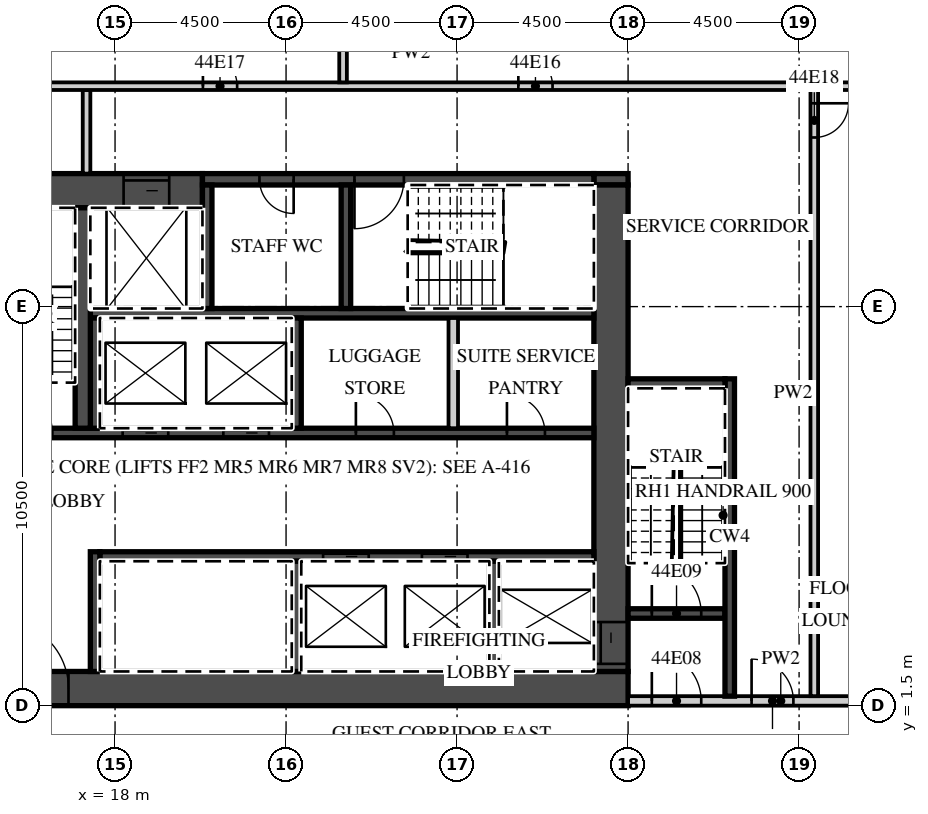
"""IFC4 building model, lengths in metres.
Left out: names, types, materials, properties, quantities, classifications, styles, units other than length and angle.
Written with IfcOpenShell. Run it as: python <this file> out.ifc"""

import sys

from ifc_helpers import new_model, si_unit, direction, frame, frame_2d, origin, place, context, subcontext, project, spatial, rectangle, extrude, element, fill, save


model = new_model("IFC4")
c1 = context("Model", 3, precision=1e-05, world=origin(), true_north=direction((0.0, 1.0)))
c2 = subcontext(c1, "Body", "Model", "MODEL_VIEW")
j1 = project(units=[si_unit("LENGTHUNIT", "METRE"), si_unit("PLANEANGLEUNIT", "RADIAN")], contexts=[c1])
p1 = place(None, origin())
s1 = spatial("IfcSite", under=j1, at=p1, CompositionType="ELEMENT")
p2 = place(p1, origin())
s2 = spatial("IfcBuilding", under=s1, at=p2, CompositionType="ELEMENT")
p3 = place(p2, frame((0.0, 0.0, 186.7)))
s3 = spatial("IfcBuildingStorey", under=s2, at=p3, CompositionType="ELEMENT", Elevation=186.7)
p4 = place(p3, frame((13.5, 1.95, 0.0), z_axis=(0.0, 0.0, 1.0), x_axis=(1.0, 0.0, 0.0)))
e1 = element("IfcWall", 1, at=p4, inside=s3, PredefinedType="SHEAR", context=c2, shape_type="SweptSolid", body=[
    extrude(rectangle(XDim=18.0, YDim=0.9, at=frame_2d((9.0, 0.0))), origin(), (0.0, 0.0, 1.0), 3.02),
])
p5 = place(p4, frame((1.475, 0.0, 0.0)))
e2 = element("IfcOpeningElement", 2, at=p5, cuts=e1, PredefinedType="OPENING", context=c2, shape_type="SweptSolid", body=[
    extrude(rectangle(XDim=1.8, YDim=2.1, at=frame_2d((0.9, 1.05))), frame((0.0, 0.46, 0.0), z_axis=(0.0, -1.0, 0.0), x_axis=(1.0, 0.0, 0.0)), (0.0, 0.0, 1.0), 0.92),
])
p6 = place(p3, frame((13.5, 15.05, 0.0), z_axis=(0.0, 0.0, 1.0), x_axis=(1.0, 0.0, 0.0)))
e3 = element("IfcWall", 3, at=p6, inside=s3, PredefinedType="SHEAR", context=c2, shape_type="SweptSolid", body=[
    extrude(rectangle(XDim=6.8, YDim=0.9, at=frame_2d((3.4, 0.0))), origin(), (0.0, 0.0, 1.0), 3.02),
])
p7 = place(p6, frame((4.725, 0.0, 0.0)))
e4 = element("IfcOpeningElement", 4, at=p7, cuts=e3, PredefinedType="OPENING", context=c2, shape_type="SweptSolid", body=[
    extrude(rectangle(XDim=1.2, YDim=2.1, at=frame_2d((0.6, 1.05))), frame((0.0, 0.46, 0.0), z_axis=(0.0, -1.0, 0.0), x_axis=(1.0, 0.0, 0.0)), (0.0, 0.0, 1.0), 0.92),
])
p8 = place(p3, frame((30.6, 15.35, 0.0), z_axis=(0.0, 0.0, 1.0), x_axis=(1.0, 0.0, 0.0)))
e5 = element("IfcWall", 5, at=p8, inside=s3, PredefinedType="SHEAR", context=c2, shape_type="SweptSolid", body=[
    extrude(rectangle(XDim=0.9, YDim=0.3, at=frame_2d((0.45, 0.0))), origin(), (0.0, 0.0, 1.0), 3.02),
])
p9 = place(p3, frame((20.3, 15.35, 0.0), z_axis=(0.0, 0.0, 1.0), x_axis=(1.0, 0.0, 0.0)))
e6 = element("IfcWall", 6, at=p9, inside=s3, PredefinedType="SHEAR", context=c2, shape_type="SweptSolid", body=[
    extrude(rectangle(XDim=10.3, YDim=0.3, at=frame_2d((5.15, 0.0))), origin(), (0.0, 0.0, 1.0), 3.02),
])
p10 = place(p9, frame((4.0, 0.0, 0.0)))
e7 = element("IfcOpeningElement", 7, at=p10, cuts=e6, PredefinedType="OPENING", context=c2, shape_type="SweptSolid", body=[
    extrude(rectangle(XDim=1.3, YDim=2.1, at=frame_2d((0.65, 1.05))), frame((0.0, 0.16, 0.0), z_axis=(0.0, -1.0, 0.0), x_axis=(1.0, 0.0, 0.0)), (0.0, 0.0, 1.0), 0.32),
])
p11 = place(p9, frame((1.5, 0.0, 0.0)))
e8 = element("IfcOpeningElement", 8, at=p11, cuts=e6, PredefinedType="OPENING", context=c2, shape_type="SweptSolid", body=[
    extrude(rectangle(XDim=0.9, YDim=2.1, at=frame_2d((0.45, 1.05))), frame((0.0, 0.16, 0.0), z_axis=(0.0, -1.0, 0.0), x_axis=(1.0, 0.0, 0.0)), (0.0, 0.0, 1.0), 0.32),
])
p12 = place(p3, frame((31.05, 2.4, 0.0), z_axis=(0.0, 0.0, 1.0), x_axis=(0.0, 1.0, 0.0)))
e9 = element("IfcWall", 9, at=p12, inside=s3, PredefinedType="SHEAR", context=c2, shape_type="SweptSolid", body=[
    extrude(rectangle(XDim=12.8, YDim=0.9, at=frame_2d((6.4, 0.0))), origin(), (0.0, 0.0, 1.0), 3.02),
])
p13 = place(p12, frame((0.2, 0.0, 0.0)))
e10 = element("IfcOpeningElement", 10, at=p13, cuts=e9, PredefinedType="OPENING", context=c2, shape_type="SweptSolid", body=[
    extrude(rectangle(XDim=1.1, YDim=2.1, at=frame_2d((0.55, 1.05))), frame((0.0, 0.46, 0.0), z_axis=(0.0, -1.0, 0.0), x_axis=(1.0, 0.0, 0.0)), (0.0, 0.0, 1.0), 0.92),
])
p14 = place(p3, frame((17.6, 5.425, 0.0), z_axis=(0.0, 0.0, 1.0), x_axis=(1.0, 0.0, 0.0)))
e11 = element("IfcWall", 11, at=p14, inside=s3, PredefinedType="SHEAR", context=c2, shape_type="SweptSolid", body=[
    extrude(rectangle(XDim=13.0, YDim=0.25, at=frame_2d((6.5, 0.0))), origin(), (0.0, 0.0, 1.0), 3.02),
])
p15 = place(p14, frame((8.475, 0.0, 0.0)))
e12 = element("IfcOpeningElement", 12, at=p15, cuts=e11, PredefinedType="OPENING", context=c2, shape_type="SweptSolid", body=[
    extrude(rectangle(XDim=1.2, YDim=2.1, at=frame_2d((0.6, 1.05))), frame((0.0, 0.135, 0.0), z_axis=(0.0, -1.0, 0.0), x_axis=(1.0, 0.0, 0.0)), (0.0, 0.0, 1.0), 0.27),
])
p16 = place(p14, frame((5.875, 0.0, 0.0)))
e13 = element("IfcOpeningElement", 13, at=p16, cuts=e11, PredefinedType="OPENING", context=c2, shape_type="SweptSolid", body=[
    extrude(rectangle(XDim=1.2, YDim=2.1, at=frame_2d((0.6, 1.05))), frame((0.0, 0.135, 0.0), z_axis=(0.0, -1.0, 0.0), x_axis=(1.0, 0.0, 0.0)), (0.0, 0.0, 1.0), 0.27),
])
p17 = place(p3, frame((17.475, 2.4, 0.0), z_axis=(0.0, 0.0, 1.0), x_axis=(0.0, 1.0, 0.0)))
e14 = element("IfcWall", 14, at=p17, inside=s3, PredefinedType="SHEAR", context=c2, shape_type="SweptSolid", body=[
    extrude(rectangle(XDim=3.15, YDim=0.25, at=frame_2d((1.575, 0.0))), origin(), (0.0, 0.0, 1.0), 3.02),
])
for number, where, z_axis, x_axis in (
    (15, (27.975, 2.4, 0.0), (0.0, 0.0, 1.0), (0.0, 1.0, 0.0)),
    (16, (22.775, 2.4, 0.0), (0.0, 0.0, 1.0), (0.0, 1.0, 0.0)),
):
    element("IfcWall", number, at=place(p3, frame(where, z_axis=z_axis, x_axis=x_axis)), inside=s3, PredefinedType="SHEAR", context=c2, shape_type="SweptSolid", body=[
        extrude(rectangle(XDim=2.9, YDim=0.25, at=frame_2d((1.45, 0.0))), origin(), (0.0, 0.0, 1.0), 3.02),
    ])
p18 = place(p3, frame((14.4, 8.675, 0.0), z_axis=(0.0, 0.0, 1.0), x_axis=(1.0, 0.0, 0.0)))
e17 = element("IfcWall", 17, at=p18, inside=s3, PredefinedType="SHEAR", context=c2, shape_type="SweptSolid", body=[
    extrude(rectangle(XDim=16.2, YDim=0.25, at=frame_2d((8.1, 0.0))), origin(), (0.0, 0.0, 1.0), 3.02),
])
p19 = place(p18, frame((6.45, 0.0, 0.0)))
e18 = element("IfcOpeningElement", 18, at=p19, cuts=e17, PredefinedType="OPENING", context=c2, shape_type="SweptSolid", body=[
    extrude(rectangle(XDim=1.2, YDim=2.1, at=frame_2d((0.6, 1.05))), frame((0.0, 0.135, 0.0), z_axis=(0.0, -1.0, 0.0), x_axis=(1.0, 0.0, 0.0)), (0.0, 0.0, 1.0), 0.27),
])
p20 = place(p18, frame((3.8, 0.0, 0.0)))
e19 = element("IfcOpeningElement", 19, at=p20, cuts=e17, PredefinedType="OPENING", context=c2, shape_type="SweptSolid", body=[
    extrude(rectangle(XDim=1.2, YDim=2.1, at=frame_2d((0.6, 1.05))), frame((0.0, 0.135, 0.0), z_axis=(0.0, -1.0, 0.0), x_axis=(1.0, 0.0, 0.0)), (0.0, 0.0, 1.0), 0.27),
])
p21 = place(p18, frame((0.65, 0.0, 0.0)))
e20 = element("IfcOpeningElement", 20, at=p21, cuts=e17, PredefinedType="OPENING", context=c2, shape_type="SweptSolid", body=[
    extrude(rectangle(XDim=1.3, YDim=2.1, at=frame_2d((0.65, 1.05))), frame((0.0, 0.135, 0.0), z_axis=(0.0, -1.0, 0.0), x_axis=(1.0, 0.0, 0.0)), (0.0, 0.0, 1.0), 0.27),
])
p22 = place(p18, frame((13.913, 0.0, 0.0)))
e21 = element("IfcOpeningElement", 21, at=p22, cuts=e17, PredefinedType="OPENING", context=c2, shape_type="SweptSolid", body=[
    extrude(rectangle(XDim=1.0, YDim=2.1, at=frame_2d((0.5, 1.05))), frame((0.0, 0.135, 0.0), z_axis=(0.0, -1.0, 0.0), x_axis=(1.0, 0.0, 0.0)), (0.0, 0.0, 1.0), 0.27),
])
p23 = place(p18, frame((9.938, 0.0, 0.0)))
e22 = element("IfcOpeningElement", 22, at=p23, cuts=e17, PredefinedType="OPENING", context=c2, shape_type="SweptSolid", body=[
    extrude(rectangle(XDim=1.0, YDim=2.1, at=frame_2d((0.5, 1.05))), frame((0.0, 0.135, 0.0), z_axis=(0.0, -1.0, 0.0), x_axis=(1.0, 0.0, 0.0)), (0.0, 0.0, 1.0), 0.27),
])
p24 = place(p3, frame((17.35, 11.825, 0.0), z_axis=(0.0, 0.0, 1.0), x_axis=(1.0, 0.0, 0.0)))
e23 = element("IfcWall", 23, at=p24, inside=s3, PredefinedType="SHEAR", context=c2, shape_type="SweptSolid", body=[
    extrude(rectangle(XDim=13.25, YDim=0.25, at=frame_2d((6.625, 0.0))), origin(), (0.0, 0.0, 1.0), 3.02),
])
for number, where, z_axis, x_axis in (
    (24, (17.475, 8.8, 0.0), (0.0, 0.0, 1.0), (0.0, 1.0, 0.0)),
    (25, (22.775, 8.8, 0.0), (0.0, 0.0, 1.0), (0.0, 1.0, 0.0)),
):
    element("IfcWall", number, at=place(p3, frame(where, z_axis=z_axis, x_axis=x_axis)), inside=s3, PredefinedType="SHEAR", context=c2, shape_type="SweptSolid", body=[
        extrude(rectangle(XDim=2.9, YDim=0.25, at=frame_2d((1.45, 0.0))), origin(), (0.0, 0.0, 1.0), 3.02),
    ])
p25 = place(p3, frame((26.9, 8.8, 0.0), z_axis=(0.0, 0.0, 1.0), x_axis=(0.0, 1.0, 0.0)))
e26 = element("IfcWall", 26, at=p25, inside=s3, PredefinedType="PARTITIONING", context=c2, shape_type="SweptSolid", body=[
    extrude(rectangle(XDim=2.9, YDim=0.25, at=frame_2d((1.45, 0.0))), origin(), (0.0, 0.0, 1.0), 3.02),
])
p26 = place(p3, frame((17.15, 8.8, 0.0), z_axis=(0.0, 0.0, 1.0), x_axis=(0.0, 1.0, 0.0)))
e27 = element("IfcWall", 27, at=p26, inside=s3, PredefinedType="SHEAR", context=c2, shape_type="SweptSolid", body=[
    extrude(rectangle(XDim=5.8, YDim=0.4, at=frame_2d((2.9, 0.0))), origin(), (0.0, 0.0, 1.0), 3.02),
])
for number, where, z_axis, x_axis in (
    (28, (20.425, 11.95, 0.0), (0.0, 0.0, 1.0), (0.0, 1.0, 0.0)),
    (29, (24.075, 11.95, 0.0), (0.0, 0.0, 1.0), (0.0, 1.0, 0.0)),
):
    element("IfcWall", number, at=place(p3, frame(where, z_axis=z_axis, x_axis=x_axis)), inside=s3, PredefinedType="SHEAR", context=c2, shape_type="SweptSolid", body=[
        extrude(rectangle(XDim=3.25, YDim=0.25, at=frame_2d((1.625, 0.0))), origin(), (0.0, 0.0, 1.0), 3.02),
    ])
p27 = place(p3, frame((31.5, 1.625, 0.0), z_axis=(0.0, 0.0, 1.0), x_axis=(1.0, 0.0, 0.0)))
e30 = element("IfcWall", 30, at=p27, inside=s3, PredefinedType="PARTITIONING", context=c2, shape_type="SweptSolid", body=[
    extrude(rectangle(XDim=8.035, YDim=0.25, at=frame_2d((4.018, 0.0))), origin(), (0.0, 0.0, 1.0), 3.02),
])
p28 = place(p27, frame((0.625, 0.0, 0.0)))
e31 = element("IfcOpeningElement", 31, at=p28, cuts=e30, PredefinedType="OPENING", context=c2, shape_type="SweptSolid", body=[
    extrude(rectangle(XDim=1.3, YDim=2.1, at=frame_2d((0.65, 1.05))), frame((0.0, 0.135, 0.0), z_axis=(0.0, -1.0, 0.0), x_axis=(1.0, 0.0, 0.0)), (0.0, 0.0, 1.0), 0.27),
])
p29 = place(p27, frame((3.25, 0.0, 0.0)))
e32 = element("IfcOpeningElement", 32, at=p29, cuts=e30, PredefinedType="OPENING", context=c2, shape_type="SweptSolid", body=[
    extrude(rectangle(XDim=1.1, YDim=2.1, at=frame_2d((0.55, 1.05))), frame((0.0, 0.135, 0.0), z_axis=(0.0, -1.0, 0.0), x_axis=(1.0, 0.0, 0.0)), (0.0, 0.0, 1.0), 0.27),
])
p30 = place(p3, frame((31.5, 3.925, 0.0), z_axis=(0.0, 0.0, 1.0), x_axis=(1.0, 0.0, 0.0)))
e33 = element("IfcWall", 33, at=p30, inside=s3, PredefinedType="SHEAR", context=c2, shape_type="SweptSolid", body=[
    extrude(rectangle(XDim=2.55, YDim=0.25, at=frame_2d((1.275, 0.0))), origin(), (0.0, 0.0, 1.0), 3.02),
])
p31 = place(p30, frame((0.625, 0.0, 0.0)))
e34 = element("IfcOpeningElement", 34, at=p31, cuts=e33, PredefinedType="OPENING", context=c2, shape_type="SweptSolid", body=[
    extrude(rectangle(XDim=1.3, YDim=2.1, at=frame_2d((0.65, 1.05))), frame((0.0, 0.135, 0.0), z_axis=(0.0, -1.0, 0.0), x_axis=(1.0, 0.0, 0.0)), (0.0, 0.0, 1.0), 0.27),
])
p32 = place(p3, frame((34.175, 1.75, 0.0), z_axis=(0.0, 0.0, 1.0), x_axis=(0.0, 1.0, 0.0)))
e35 = element("IfcWall", 35, at=p32, inside=s3, PredefinedType="SHEAR", context=c2, shape_type="SweptSolid", body=[
    extrude(rectangle(XDim=8.35, YDim=0.25, at=frame_2d((4.175, 0.0))), origin(), (0.0, 0.0, 1.0), 3.02),
])
p33 = place(p3, frame((31.5, 9.975, 0.0), z_axis=(0.0, 0.0, 1.0), x_axis=(1.0, 0.0, 0.0)))
e36 = element("IfcWall", 36, at=p33, inside=s3, PredefinedType="SHEAR", context=c2, shape_type="SweptSolid", body=[
    extrude(rectangle(XDim=2.55, YDim=0.25, at=frame_2d((1.275, 0.0))), origin(), (0.0, 0.0, 1.0), 3.02),
])
p34 = place(p3, frame((17.25, 15.5, 0.0), z_axis=(0.0, 0.0, 1.0), x_axis=(0.0, 1.0, 0.0)))
e37 = element("IfcWall", 37, at=p34, inside=s3, PredefinedType="PARTITIONING", context=c2, shape_type="SweptSolid", body=[
    extrude(rectangle(XDim=2.2, YDim=0.2, at=frame_2d((1.1, 0.0))), origin(), (0.0, 0.0, 1.0), 3.02),
])
p35 = place(p3, frame((36.4, 1.75, 0.0), z_axis=(0.0, 0.0, 1.0), x_axis=(0.0, 1.0, 0.0)))
e38 = element("IfcWall", 38, at=p35, inside=s3, PredefinedType="PARTITIONING", context=c2, shape_type="SweptSolid", body=[
    extrude(rectangle(XDim=15.95, YDim=0.2, at=frame_2d((7.975, 0.0))), origin(), (0.0, 0.0, 1.0), 3.02),
])
p36 = place(p35, frame((14.7, 0.0, 0.0)))
e39 = element("IfcOpeningElement", 39, at=p36, cuts=e38, PredefinedType="OPENING", context=c2, shape_type="SweptSolid", body=[
    extrude(rectangle(XDim=0.9, YDim=2.1, at=frame_2d((0.45, 1.05))), frame((0.0, 0.11, 0.0), z_axis=(0.0, -1.0, 0.0), x_axis=(1.0, 0.0, 0.0)), (0.0, 0.0, 1.0), 0.22),
])
p37 = place(p3, frame((13.6, 17.8, 0.0), z_axis=(0.0, 0.0, 1.0), x_axis=(1.0, 0.0, 0.0)))
e40 = element("IfcWall", 40, at=p37, inside=s3, PredefinedType="PARTITIONING", context=c2, shape_type="SweptSolid", body=[
    extrude(rectangle(XDim=24.378, YDim=0.2, at=frame_2d((12.189, 0.0))), origin(), (0.0, 0.0, 1.0), 3.02),
])
p38 = place(p37, frame((15.012, 0.0, 0.0)))
e41 = element("IfcOpeningElement", 41, at=p38, cuts=e40, PredefinedType="OPENING", context=c2, shape_type="SweptSolid", body=[
    extrude(rectangle(XDim=0.9, YDim=2.1, at=frame_2d((0.45, 1.05))), frame((0.0, 0.11, 0.0), z_axis=(0.0, -1.0, 0.0), x_axis=(1.0, 0.0, 0.0)), (0.0, 0.0, 1.0), 0.22),
])
p39 = place(p37, frame((6.712, 0.0, 0.0)))
e42 = element("IfcOpeningElement", 42, at=p39, cuts=e40, PredefinedType="OPENING", context=c2, shape_type="SweptSolid", body=[
    extrude(rectangle(XDim=0.9, YDim=2.1, at=frame_2d((0.45, 1.05))), frame((0.0, 0.11, 0.0), z_axis=(0.0, -1.0, 0.0), x_axis=(1.0, 0.0, 0.0)), (0.0, 0.0, 1.0), 0.22),
])
p40 = place(p3, frame((24.0, 17.9, 0.0), z_axis=(0.0, 0.0, 1.0), x_axis=(0.0, 1.0, 0.0)))
e43 = element("IfcWall", 43, at=p40, inside=s3, PredefinedType="PARTITIONING", context=c2, shape_type="SweptSolid", body=[
    extrude(rectangle(XDim=4.701, YDim=0.2, at=frame_2d((2.351, 0.0))), origin(), (0.0, 0.0, 1.0), 3.02),
])
p41 = place(p19, origin())
e44 = element("IfcDoor", 44, at=p41, inside=s3, OperationType="SLIDING_TO_LEFT", PredefinedType="DOOR", context=c2, shape_type="SweptSolid", body=[
    extrude(rectangle(XDim=1.2, YDim=2.1, at=frame_2d((0.6, 1.05))), frame((0.0, 0.025, 0.0), z_axis=(0.0, -1.0, 0.0), x_axis=(1.0, 0.0, 0.0)), (0.0, 0.0, 1.0), 0.05),
])
fill(e18, e44)
p42 = place(p20, origin())
e45 = element("IfcDoor", 45, at=p42, inside=s3, OperationType="SLIDING_TO_RIGHT", PredefinedType="DOOR", context=c2, shape_type="SweptSolid", body=[
    extrude(rectangle(XDim=1.2, YDim=2.1, at=frame_2d((0.6, 1.05))), frame((0.0, 0.025, 0.0), z_axis=(0.0, -1.0, 0.0), x_axis=(1.0, 0.0, 0.0)), (0.0, 0.0, 1.0), 0.05),
])
fill(e19, e45)
p43 = place(p15, origin())
e46 = element("IfcDoor", 46, at=p43, inside=s3, OperationType="SLIDING_TO_LEFT", PredefinedType="DOOR", context=c2, shape_type="SweptSolid", body=[
    extrude(rectangle(XDim=1.2, YDim=2.1, at=frame_2d((0.6, 1.05))), frame((0.0, 0.025, 0.0), z_axis=(0.0, -1.0, 0.0), x_axis=(1.0, 0.0, 0.0)), (0.0, 0.0, 1.0), 0.05),
])
fill(e12, e46)
p44 = place(p16, origin())
e47 = element("IfcDoor", 47, at=p44, inside=s3, OperationType="SLIDING_TO_RIGHT", PredefinedType="DOOR", context=c2, shape_type="SweptSolid", body=[
    extrude(rectangle(XDim=1.2, YDim=2.1, at=frame_2d((0.6, 1.05))), frame((0.0, 0.025, 0.0), z_axis=(0.0, -1.0, 0.0), x_axis=(1.0, 0.0, 0.0)), (0.0, 0.0, 1.0), 0.05),
])
fill(e13, e47)
p45 = place(p7, origin())
e48 = element("IfcDoor", 48, at=p45, inside=s3, OperationType="SLIDING_TO_LEFT", PredefinedType="DOOR", context=c2, shape_type="SweptSolid", body=[
    extrude(rectangle(XDim=1.2, YDim=2.1, at=frame_2d((0.6, 1.05))), frame((0.0, 0.025, 0.0), z_axis=(0.0, -1.0, 0.0), x_axis=(1.0, 0.0, 0.0)), (0.0, 0.0, 1.0), 0.05),
])
fill(e4, e48)
p46 = place(p13, origin())
e49 = element("IfcDoor", 49, at=p46, inside=s3, OperationType="SLIDING_TO_LEFT", PredefinedType="DOOR", context=c2, shape_type="SweptSolid", body=[
    extrude(rectangle(XDim=1.1, YDim=2.1, at=frame_2d((0.55, 1.05))), frame((0.0, 0.025, 0.0), z_axis=(0.0, -1.0, 0.0), x_axis=(1.0, 0.0, 0.0)), (0.0, 0.0, 1.0), 0.05),
])
fill(e10, e49)
p47 = place(p5, origin())
e50 = element("IfcDoor", 50, at=p47, inside=s3, OperationType="DOUBLE_DOOR_DOUBLE_SWING", PredefinedType="DOOR", context=c2, shape_type="SweptSolid", body=[
    extrude(rectangle(XDim=1.8, YDim=2.1, at=frame_2d((0.9, 1.05))), frame((0.0, 0.025, 0.0), z_axis=(0.0, -1.0, 0.0), x_axis=(1.0, 0.0, 0.0)), (0.0, 0.0, 1.0), 0.05),
])
fill(e2, e50)
p48 = place(p28, origin())
e51 = element("IfcDoor", 51, at=p48, inside=s3, OperationType="SINGLE_SWING_LEFT", PredefinedType="DOOR", context=c2, shape_type="SweptSolid", body=[
    extrude(rectangle(XDim=1.3, YDim=2.1, at=frame_2d((0.65, 1.05))), frame((0.0, 0.025, 0.0), z_axis=(0.0, -1.0, 0.0), x_axis=(1.0, 0.0, 0.0)), (0.0, 0.0, 1.0), 0.05),
])
fill(e31, e51)
p49 = place(p31, origin())
e52 = element("IfcDoor", 52, at=p49, inside=s3, OperationType="SINGLE_SWING_LEFT", PredefinedType="DOOR", context=c2, shape_type="SweptSolid", body=[
    extrude(rectangle(XDim=1.3, YDim=2.1, at=frame_2d((0.65, 1.05))), frame((0.0, 0.025, 0.0), z_axis=(0.0, -1.0, 0.0), x_axis=(1.0, 0.0, 0.0)), (0.0, 0.0, 1.0), 0.05),
])
fill(e34, e52)
p50 = place(p29, origin())
e53 = element("IfcDoor", 53, at=p50, inside=s3, OperationType="SINGLE_SWING_LEFT", PredefinedType="DOOR", context=c2, shape_type="SweptSolid", body=[
    extrude(rectangle(XDim=1.1, YDim=2.1, at=frame_2d((0.55, 1.05))), frame((0.0, 0.025, 0.0), z_axis=(0.0, -1.0, 0.0), x_axis=(1.0, 0.0, 0.0)), (0.0, 0.0, 1.0), 0.05),
])
fill(e32, e53)
p51 = place(p10, origin())
e54 = element("IfcDoor", 54, at=p51, inside=s3, OperationType="SINGLE_SWING_LEFT", PredefinedType="DOOR", context=c2, shape_type="SweptSolid", body=[
    extrude(rectangle(XDim=1.3, YDim=2.1, at=frame_2d((0.65, 1.05))), frame((0.0, 0.025, 0.0), z_axis=(0.0, -1.0, 0.0), x_axis=(1.0, 0.0, 0.0)), (0.0, 0.0, 1.0), 0.05),
])
fill(e7, e54)
p52 = place(p11, origin())
e55 = element("IfcDoor", 55, at=p52, inside=s3, OperationType="SINGLE_SWING_RIGHT", PredefinedType="DOOR", context=c2, shape_type="SweptSolid", body=[
    extrude(rectangle(XDim=0.9, YDim=2.1, at=frame_2d((0.45, 1.05))), frame((0.0, 0.025, 0.0), z_axis=(0.0, -1.0, 0.0), x_axis=(1.0, 0.0, 0.0)), (0.0, 0.0, 1.0), 0.05),
])
fill(e8, e55)
p53 = place(p22, origin())
e56 = element("IfcDoor", 56, at=p53, inside=s3, OperationType="SINGLE_SWING_LEFT", PredefinedType="DOOR", context=c2, shape_type="SweptSolid", body=[
    extrude(rectangle(XDim=1.0, YDim=2.1, at=frame_2d((0.5, 1.05))), frame((0.0, 0.025, 0.0), z_axis=(0.0, -1.0, 0.0), x_axis=(1.0, 0.0, 0.0)), (0.0, 0.0, 1.0), 0.05),
])
fill(e21, e56)
p54 = place(p23, origin())
e57 = element("IfcDoor", 57, at=p54, inside=s3, OperationType="SINGLE_SWING_LEFT", PredefinedType="DOOR", context=c2, shape_type="SweptSolid", body=[
    extrude(rectangle(XDim=1.0, YDim=2.1, at=frame_2d((0.5, 1.05))), frame((0.0, 0.025, 0.0), z_axis=(0.0, -1.0, 0.0), x_axis=(1.0, 0.0, 0.0)), (0.0, 0.0, 1.0), 0.05),
])
fill(e22, e57)
p55 = place(p38, origin())
e58 = element("IfcDoor", 58, at=p55, inside=s3, OperationType="SINGLE_SWING_LEFT", PredefinedType="DOOR", context=c2, shape_type="SweptSolid", body=[
    extrude(rectangle(XDim=0.9, YDim=2.1, at=frame_2d((0.45, 1.05))), frame((0.0, 0.025, 0.0), z_axis=(0.0, -1.0, 0.0), x_axis=(1.0, 0.0, 0.0)), (0.0, 0.0, 1.0), 0.05),
])
fill(e41, e58)
p56 = place(p39, origin())
e59 = element("IfcDoor", 59, at=p56, inside=s3, OperationType="SINGLE_SWING_LEFT", PredefinedType="DOOR", context=c2, shape_type="SweptSolid", body=[
    extrude(rectangle(XDim=0.9, YDim=2.1, at=frame_2d((0.45, 1.05))), frame((0.0, 0.025, 0.0), z_axis=(0.0, -1.0, 0.0), x_axis=(1.0, 0.0, 0.0)), (0.0, 0.0, 1.0), 0.05),
])
fill(e42, e59)
p57 = place(p36, origin())
e60 = element("IfcDoor", 60, at=p57, inside=s3, OperationType="SINGLE_SWING_RIGHT", PredefinedType="DOOR", context=c2, shape_type="SweptSolid", body=[
    extrude(rectangle(XDim=0.9, YDim=2.1, at=frame_2d((0.45, 1.05))), frame((0.0, 0.025, 0.0), z_axis=(0.0, -1.0, 0.0), x_axis=(1.0, 0.0, 0.0)), (0.0, 0.0, 1.0), 0.05),
])
fill(e39, e60)
save(model, sys.argv[1])
